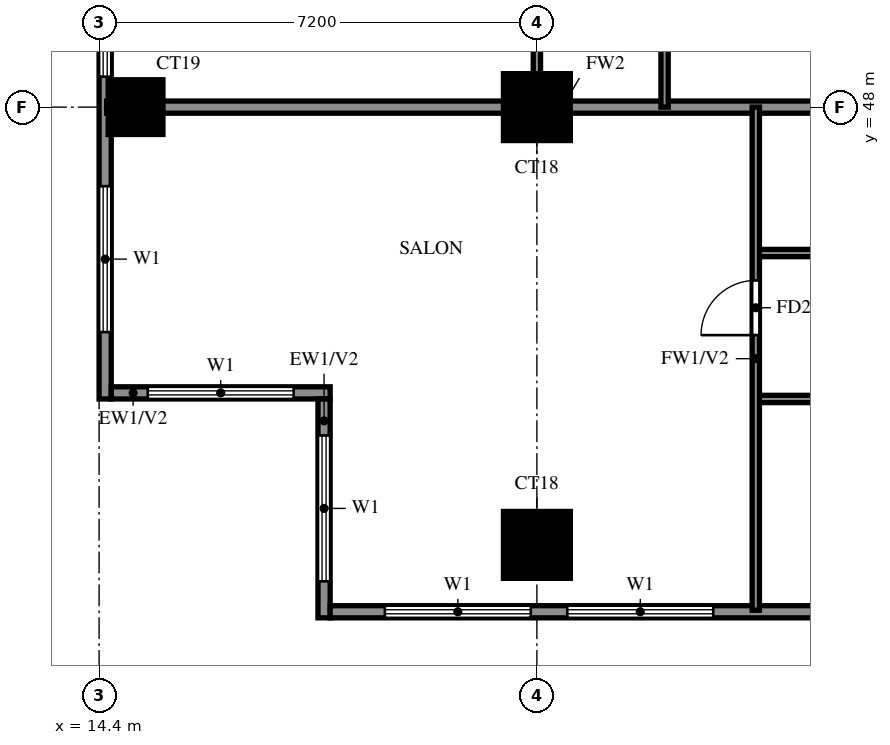
"""IFC4 building model, lengths in metres.
Left out: names, types, materials, properties, quantities, classifications, styles, units other than length and angle.
Written with IfcOpenShell. Run it as: python <this file> out.ifc"""

import sys

from ifc_helpers import new_model, si_unit, direction, frame, frame_2d, origin, origin_2d, place, context, subcontext, project, spatial, rectangle, extrude, source, transform, mapped, element, fill, save


model = new_model("IFC4")
c1 = context("Model", 3, precision=1e-05, world=origin(), true_north=direction((0.0, 1.0)))
c2 = subcontext(c1, "Body", "Model", "MODEL_VIEW")
j1 = project(units=[si_unit("LENGTHUNIT", "METRE"), si_unit("PLANEANGLEUNIT", "RADIAN")], contexts=[c1])
p1 = place(None, origin())
s1 = spatial("IfcSite", under=j1, at=p1, CompositionType="ELEMENT")
p2 = place(p1, origin())
s2 = spatial("IfcBuilding", under=s1, at=p2, CompositionType="ELEMENT")
p3 = place(p2, frame((0.0, 0.0, 127.0)))
s3 = spatial("IfcBuildingStorey", under=s2, at=p3, CompositionType="ELEMENT", Elevation=127.0)
m1 = source(origin(), c2, "Body", "SweptSolid", [
    extrude(rectangle(XDim=1.1, YDim=1.1, at=origin_2d()), origin(), (0.0, 0.0, 1.0), 3.2),
])
p4 = place(p3, frame((21.6, 40.8, 0.0), z_axis=(0.0, 0.0, 1.0), x_axis=(1.0, 0.0, 0.0)))
e1 = element("IfcColumn", 1, at=p4, inside=s3, PredefinedType="COLUMN", context=c2, shape_type="MappedRepresentation", body=[
    mapped(m1, transform((0.0, 0.0, 0.0))),
])
m2 = source(origin(), c2, "Body", "SweptSolid", [
    extrude(rectangle(XDim=0.9, YDim=0.9, at=origin_2d()), origin(), (0.0, 0.0, 1.0), 3.2),
])
p5 = place(p3, frame((15.0, 48.0, 0.0), z_axis=(0.0, 0.0, 1.0), x_axis=(1.0, 0.0, 0.0)))
e2 = element("IfcColumn", 2, at=p5, inside=s3, PredefinedType="COLUMN", context=c2, shape_type="MappedRepresentation", body=[
    mapped(m2, transform((0.0, 0.0, 0.0))),
])
p6 = place(p3, frame((21.6, 48.0, 0.0), z_axis=(0.0, 0.0, 1.0), x_axis=(1.0, 0.0, 0.0)))
e3 = element("IfcColumn", 3, at=p6, inside=s3, PredefinedType="COLUMN", context=c2, shape_type="MappedRepresentation", body=[
    mapped(m1, transform((0.0, 0.0, 0.0))),
])
p7 = place(p3, frame((14.5, 76.6, 0.0), z_axis=(0.0, 0.0, 1.0), x_axis=(0.0, -1.0, 0.0)))
e4 = element("IfcWall", 4, at=p7, inside=s3, PredefinedType="SOLIDWALL", context=c2, shape_type="SweptSolid", body=[
    extrude(rectangle(XDim=33.4, YDim=0.2, at=frame_2d((16.7, 0.0))), origin(), (0.0, 0.0, 1.0), 3.2),
])
p8 = place(p7, frame((7.9, 0.0, 0.0)))
e5 = element("IfcOpeningElement", 5, at=p8, cuts=e4, PredefinedType="OPENING", context=c2, shape_type="SweptSolid", body=[
    extrude(rectangle(XDim=1.8, YDim=2.4, at=frame_2d((0.9, 1.2))), frame((0.0, 0.11, 0.0), z_axis=(0.0, -1.0, 0.0), x_axis=(1.0, 0.0, 0.0)), (0.0, 0.0, 1.0), 0.22),
])
p9 = place(p7, frame((22.3, 0.0, 0.0)))
e6 = element("IfcOpeningElement", 6, at=p9, cuts=e4, PredefinedType="OPENING", context=c2, shape_type="SweptSolid", body=[
    extrude(rectangle(XDim=1.8, YDim=2.4, at=frame_2d((0.9, 1.2))), frame((0.0, 0.11, 0.0), z_axis=(0.0, -1.0, 0.0), x_axis=(1.0, 0.0, 0.0)), (0.0, 0.0, 1.0), 0.22),
])
p10 = place(p7, frame((29.9, 0.0, 0.6)))
e7 = element("IfcOpeningElement", 7, at=p10, cuts=e4, PredefinedType="OPENING", context=c2, shape_type="SweptSolid", body=[
    extrude(rectangle(XDim=2.4, YDim=2.4, at=frame_2d((1.2, 1.2))), frame((0.0, 0.11, 0.0), z_axis=(0.0, -1.0, 0.0), x_axis=(1.0, 0.0, 0.0)), (0.0, 0.0, 1.0), 0.22),
])
p11 = place(p7, frame((24.55, 0.0, 0.6)))
e8 = element("IfcOpeningElement", 8, at=p11, cuts=e4, PredefinedType="OPENING", context=c2, shape_type="SweptSolid", body=[
    extrude(rectangle(XDim=0.9, YDim=2.4, at=frame_2d((0.45, 1.2))), frame((0.0, 0.11, 0.0), z_axis=(0.0, -1.0, 0.0), x_axis=(1.0, 0.0, 0.0)), (0.0, 0.0, 1.0), 0.22),
])
p12 = place(p7, frame((26.3, 0.0, 0.6)))
e9 = element("IfcOpeningElement", 9, at=p12, cuts=e4, PredefinedType="OPENING", context=c2, shape_type="SweptSolid", body=[
    extrude(rectangle(XDim=1.8, YDim=2.4, at=frame_2d((0.9, 1.2))), frame((0.0, 0.11, 0.0), z_axis=(0.0, -1.0, 0.0), x_axis=(1.0, 0.0, 0.0)), (0.0, 0.0, 1.0), 0.22),
])
p13 = place(p7, frame((17.95, 0.0, 0.6)))
e10 = element("IfcOpeningElement", 10, at=p13, cuts=e4, PredefinedType="OPENING", context=c2, shape_type="SweptSolid", body=[
    extrude(rectangle(XDim=0.9, YDim=2.4, at=frame_2d((0.45, 1.2))), frame((0.0, 0.11, 0.0), z_axis=(0.0, -1.0, 0.0), x_axis=(1.0, 0.0, 0.0)), (0.0, 0.0, 1.0), 0.22),
])
p14 = place(p7, frame((19.85, 0.0, 0.6)))
e11 = element("IfcOpeningElement", 11, at=p14, cuts=e4, PredefinedType="OPENING", context=c2, shape_type="SweptSolid", body=[
    extrude(rectangle(XDim=0.9, YDim=2.4, at=frame_2d((0.45, 1.2))), frame((0.0, 0.11, 0.0), z_axis=(0.0, -1.0, 0.0), x_axis=(1.0, 0.0, 0.0)), (0.0, 0.0, 1.0), 0.22),
])
p15 = place(p7, frame((15.3, 0.0, 0.6)))
e12 = element("IfcOpeningElement", 12, at=p15, cuts=e4, PredefinedType="OPENING", context=c2, shape_type="SweptSolid", body=[
    extrude(rectangle(XDim=1.8, YDim=2.4, at=frame_2d((0.9, 1.2))), frame((0.0, 0.11, 0.0), z_axis=(0.0, -1.0, 0.0), x_axis=(1.0, 0.0, 0.0)), (0.0, 0.0, 1.0), 0.22),
])
p16 = place(p7, frame((12.35, 0.0, 1.5)))
e13 = element("IfcOpeningElement", 13, at=p16, cuts=e4, PredefinedType="OPENING", context=c2, shape_type="SweptSolid", body=[
    extrude(rectangle(XDim=0.9, YDim=0.9, at=frame_2d((0.45, 0.45))), frame((0.0, 0.11, 0.0), z_axis=(0.0, -1.0, 0.0), x_axis=(1.0, 0.0, 0.0)), (0.0, 0.0, 1.0), 0.22),
])
p17 = place(p7, frame((3.55, 0.0, 0.6)))
e14 = element("IfcOpeningElement", 14, at=p17, cuts=e4, PredefinedType="OPENING", context=c2, shape_type="SweptSolid", body=[
    extrude(rectangle(XDim=0.9, YDim=2.4, at=frame_2d((0.45, 1.2))), frame((0.0, 0.11, 0.0), z_axis=(0.0, -1.0, 0.0), x_axis=(1.0, 0.0, 0.0)), (0.0, 0.0, 1.0), 0.22),
])
p18 = place(p7, frame((5.3, 0.0, 0.6)))
e15 = element("IfcOpeningElement", 15, at=p18, cuts=e4, PredefinedType="OPENING", context=c2, shape_type="SweptSolid", body=[
    extrude(rectangle(XDim=1.2, YDim=2.4, at=frame_2d((0.6, 1.2))), frame((0.0, 0.11, 0.0), z_axis=(0.0, -1.0, 0.0), x_axis=(1.0, 0.0, 0.0)), (0.0, 0.0, 1.0), 0.22),
])
p19 = place(p7, frame((0.6, 0.0, 0.6)))
e16 = element("IfcOpeningElement", 16, at=p19, cuts=e4, PredefinedType="OPENING", context=c2, shape_type="SweptSolid", body=[
    extrude(rectangle(XDim=2.4, YDim=2.4, at=frame_2d((1.2, 1.2))), frame((0.0, 0.11, 0.0), z_axis=(0.0, -1.0, 0.0), x_axis=(1.0, 0.0, 0.0)), (0.0, 0.0, 1.0), 0.22),
])
p20 = place(p3, frame((14.6, 43.3, 0.0), z_axis=(0.0, 0.0, 1.0), x_axis=(1.0, 0.0, 0.0)))
e17 = element("IfcWall", 17, at=p20, inside=s3, PredefinedType="SOLIDWALL", context=c2, shape_type="SweptSolid", body=[
    extrude(rectangle(XDim=3.6, YDim=0.2, at=frame_2d((1.8, 0.0))), origin(), (0.0, 0.0, 1.0), 3.2),
])
p21 = place(p20, frame((0.6, 0.0, 0.6)))
e18 = element("IfcOpeningElement", 18, at=p21, cuts=e17, PredefinedType="OPENING", context=c2, shape_type="SweptSolid", body=[
    extrude(rectangle(XDim=2.4, YDim=2.4, at=frame_2d((1.2, 1.2))), frame((0.0, 0.11, 0.0), z_axis=(0.0, -1.0, 0.0), x_axis=(1.0, 0.0, 0.0)), (0.0, 0.0, 1.0), 0.22),
])
p22 = place(p3, frame((18.1, 43.2, 0.0), z_axis=(0.0, 0.0, 1.0), x_axis=(0.0, -1.0, 0.0)))
e19 = element("IfcWall", 19, at=p22, inside=s3, PredefinedType="SOLIDWALL", context=c2, shape_type="SweptSolid", body=[
    extrude(rectangle(XDim=3.6, YDim=0.2, at=frame_2d((1.8, 0.0))), origin(), (0.0, 0.0, 1.0), 3.2),
])
p23 = place(p22, frame((0.6, 0.0, 0.6)))
e20 = element("IfcOpeningElement", 20, at=p23, cuts=e19, PredefinedType="OPENING", context=c2, shape_type="SweptSolid", body=[
    extrude(rectangle(XDim=2.4, YDim=2.4, at=frame_2d((1.2, 1.2))), frame((0.0, 0.11, 0.0), z_axis=(0.0, -1.0, 0.0), x_axis=(1.0, 0.0, 0.0)), (0.0, 0.0, 1.0), 0.22),
])
p24 = place(p3, frame((18.2, 39.7, 0.0), z_axis=(0.0, 0.0, 1.0), x_axis=(1.0, 0.0, 0.0)))
e21 = element("IfcWall", 21, at=p24, inside=s3, PredefinedType="SOLIDWALL", context=c2, shape_type="SweptSolid", body=[
    extrude(rectangle(XDim=23.8, YDim=0.2, at=frame_2d((11.9, 0.0))), origin(), (0.0, 0.0, 1.0), 3.2),
])
p25 = place(p24, frame((13.3, 0.0, 0.0)))
e22 = element("IfcOpeningElement", 22, at=p25, cuts=e21, PredefinedType="OPENING", context=c2, shape_type="SweptSolid", body=[
    extrude(rectangle(XDim=1.8, YDim=2.4, at=frame_2d((0.9, 1.2))), frame((0.0, 0.11, 0.0), z_axis=(0.0, -1.0, 0.0), x_axis=(1.0, 0.0, 0.0)), (0.0, 0.0, 1.0), 0.22),
])
p26 = place(p24, frame((0.9, 0.0, 0.6)))
e23 = element("IfcOpeningElement", 23, at=p26, cuts=e21, PredefinedType="OPENING", context=c2, shape_type="SweptSolid", body=[
    extrude(rectangle(XDim=2.4, YDim=2.4, at=frame_2d((1.2, 1.2))), frame((0.0, 0.11, 0.0), z_axis=(0.0, -1.0, 0.0), x_axis=(1.0, 0.0, 0.0)), (0.0, 0.0, 1.0), 0.22),
])
p27 = place(p24, frame((3.9, 0.0, 0.6)))
e24 = element("IfcOpeningElement", 24, at=p27, cuts=e21, PredefinedType="OPENING", context=c2, shape_type="SweptSolid", body=[
    extrude(rectangle(XDim=2.4, YDim=2.4, at=frame_2d((1.2, 1.2))), frame((0.0, 0.11, 0.0), z_axis=(0.0, -1.0, 0.0), x_axis=(1.0, 0.0, 0.0)), (0.0, 0.0, 1.0), 0.22),
])
p28 = place(p24, frame((11.5, 0.0, 0.6)))
e25 = element("IfcOpeningElement", 25, at=p28, cuts=e21, PredefinedType="OPENING", context=c2, shape_type="SweptSolid", body=[
    extrude(rectangle(XDim=1.2, YDim=2.4, at=frame_2d((0.6, 1.2))), frame((0.0, 0.11, 0.0), z_axis=(0.0, -1.0, 0.0), x_axis=(1.0, 0.0, 0.0)), (0.0, 0.0, 1.0), 0.22),
])
p29 = place(p24, frame((8.35, 0.0, 1.5)))
e26 = element("IfcOpeningElement", 26, at=p29, cuts=e21, PredefinedType="OPENING", context=c2, shape_type="SweptSolid", body=[
    extrude(rectangle(XDim=0.9, YDim=0.9, at=frame_2d((0.45, 0.45))), frame((0.0, 0.11, 0.0), z_axis=(0.0, -1.0, 0.0), x_axis=(1.0, 0.0, 0.0)), (0.0, 0.0, 1.0), 0.22),
])
p30 = place(p3, frame((14.525, 48.0, 0.0), z_axis=(0.0, 0.0, 1.0), x_axis=(1.0, 0.0, 0.0)))
e27 = element("IfcWall", 27, at=p30, inside=s3, PredefinedType="SOLIDWALL", context=c2, shape_type="SweptSolid", body=[
    extrude(rectangle(XDim=14.275, YDim=0.2, at=frame_2d((7.138, 0.0))), origin(), (0.0, 0.0, 1.0), 3.2),
])
p31 = place(p3, frame((25.2, 43.2, 0.0), z_axis=(0.0, 0.0, 1.0), x_axis=(1.0, 0.0, 0.0)))
e28 = element("IfcWall", 28, at=p31, inside=s3, PredefinedType="PARTITIONING", context=c2, shape_type="SweptSolid", body=[
    extrude(rectangle(XDim=3.6, YDim=0.12, at=frame_2d((1.8, 0.0))), origin(), (0.0, 0.0, 1.0), 3.2),
])
p32 = place(p3, frame((25.2, 45.6, 0.0), z_axis=(0.0, 0.0, 1.0), x_axis=(1.0, 0.0, 0.0)))
e29 = element("IfcWall", 29, at=p32, inside=s3, PredefinedType="PARTITIONING", context=c2, shape_type="SweptSolid", body=[
    extrude(rectangle(XDim=6.0, YDim=0.12, at=frame_2d((3.0, 0.0))), origin(), (0.0, 0.0, 1.0), 3.2),
])
p33 = place(p32, frame((2.55, 0.0, 0.0)))
e30 = element("IfcOpeningElement", 30, at=p33, cuts=e29, PredefinedType="OPENING", context=c2, shape_type="SweptSolid", body=[
    extrude(rectangle(XDim=0.9, YDim=2.1, at=frame_2d((0.45, 1.05))), frame((0.0, 0.07, 0.0), z_axis=(0.0, -1.0, 0.0), x_axis=(1.0, 0.0, 0.0)), (0.0, 0.0, 1.0), 0.14),
])
p34 = place(p3, frame((21.6, 48.0, 0.0), z_axis=(0.0, 0.0, 1.0), x_axis=(0.0, 1.0, 0.0)))
e31 = element("IfcWall", 31, at=p34, inside=s3, PredefinedType="PARTITIONING", context=c2, shape_type="SweptSolid", body=[
    extrude(rectangle(XDim=14.4, YDim=0.12, at=frame_2d((7.2, 0.0))), origin(), (0.0, 0.0, 1.0), 3.2),
])
p35 = place(p34, frame((2.85, 0.0, 0.0)))
e32 = element("IfcOpeningElement", 32, at=p35, cuts=e31, PredefinedType="OPENING", context=c2, shape_type="SweptSolid", body=[
    extrude(rectangle(XDim=1.5, YDim=2.1, at=frame_2d((0.75, 1.05))), frame((0.0, 0.07, 0.0), z_axis=(0.0, -1.0, 0.0), x_axis=(1.0, 0.0, 0.0)), (0.0, 0.0, 1.0), 0.14),
])
p36 = place(p34, frame((8.55, 0.0, 0.0)))
e33 = element("IfcOpeningElement", 33, at=p36, cuts=e31, PredefinedType="OPENING", context=c2, shape_type="SweptSolid", body=[
    extrude(rectangle(XDim=0.9, YDim=2.1, at=frame_2d((0.45, 1.05))), frame((0.0, 0.07, 0.0), z_axis=(0.0, -1.0, 0.0), x_axis=(1.0, 0.0, 0.0)), (0.0, 0.0, 1.0), 0.14),
])
p37 = place(p34, frame((12.15, 0.0, 0.0)))
e34 = element("IfcOpeningElement", 34, at=p37, cuts=e31, PredefinedType="OPENING", context=c2, shape_type="SweptSolid", body=[
    extrude(rectangle(XDim=0.9, YDim=2.1, at=frame_2d((0.45, 1.05))), frame((0.0, 0.07, 0.0), z_axis=(0.0, -1.0, 0.0), x_axis=(1.0, 0.0, 0.0)), (0.0, 0.0, 1.0), 0.14),
])
p38 = place(p3, frame((23.7, 48.0, 0.0), z_axis=(0.0, 0.0, 1.0), x_axis=(0.0, 1.0, 0.0)))
e35 = element("IfcWall", 35, at=p38, inside=s3, PredefinedType="PARTITIONING", context=c2, shape_type="SweptSolid", body=[
    extrude(rectangle(XDim=2.4, YDim=0.12, at=frame_2d((1.2, 0.0))), origin(), (0.0, 0.0, 1.0), 3.2),
])
p39 = place(p3, frame((25.2, 39.725, 0.0), z_axis=(0.0, 0.0, 1.0), x_axis=(0.0, 1.0, 0.0)))
e36 = element("IfcWall", 36, at=p39, inside=s3, PredefinedType="PARTITIONING", context=c2, shape_type="SweptSolid", body=[
    extrude(rectangle(XDim=8.275, YDim=0.12, at=frame_2d((4.137, 0.0))), origin(), (0.0, 0.0, 1.0), 3.2),
])
p40 = place(p39, frame((4.525, 0.0, 0.0)))
e37 = element("IfcOpeningElement", 37, at=p40, cuts=e36, PredefinedType="OPENING", context=c2, shape_type="SweptSolid", body=[
    extrude(rectangle(XDim=0.9, YDim=2.1, at=frame_2d((0.45, 1.05))), frame((0.0, 0.07, 0.0), z_axis=(0.0, -1.0, 0.0), x_axis=(1.0, 0.0, 0.0)), (0.0, 0.0, 1.0), 0.14),
])
p41 = place(p10, origin())
e38 = element("IfcWindow", 38, at=p41, inside=s3, PartitioningType="DOUBLE_PANEL_VERTICAL", PredefinedType="WINDOW", context=c2, shape_type="SweptSolid", body=[
    extrude(rectangle(XDim=2.4, YDim=2.4, at=frame_2d((1.2, 1.2))), frame((0.0, 0.03, 0.0), z_axis=(0.0, -1.0, 0.0), x_axis=(1.0, 0.0, 0.0)), (0.0, 0.0, 1.0), 0.06),
])
fill(e7, e38)
p42 = place(p12, origin())
e39 = element("IfcWindow", 39, at=p42, inside=s3, PartitioningType="DOUBLE_PANEL_VERTICAL", PredefinedType="WINDOW", context=c2, shape_type="SweptSolid", body=[
    extrude(rectangle(XDim=1.8, YDim=2.4, at=frame_2d((0.9, 1.2))), frame((0.0, 0.03, 0.0), z_axis=(0.0, -1.0, 0.0), x_axis=(1.0, 0.0, 0.0)), (0.0, 0.0, 1.0), 0.06),
])
fill(e9, e39)
p43 = place(p21, origin())
e40 = element("IfcWindow", 40, at=p43, inside=s3, PartitioningType="DOUBLE_PANEL_VERTICAL", PredefinedType="WINDOW", context=c2, shape_type="SweptSolid", body=[
    extrude(rectangle(XDim=2.4, YDim=2.4, at=frame_2d((1.2, 1.2))), frame((0.0, 0.03, 0.0), z_axis=(0.0, -1.0, 0.0), x_axis=(1.0, 0.0, 0.0)), (0.0, 0.0, 1.0), 0.06),
])
fill(e18, e40)
p44 = place(p23, origin())
e41 = element("IfcWindow", 41, at=p44, inside=s3, PartitioningType="DOUBLE_PANEL_VERTICAL", PredefinedType="WINDOW", context=c2, shape_type="SweptSolid", body=[
    extrude(rectangle(XDim=2.4, YDim=2.4, at=frame_2d((1.2, 1.2))), frame((0.0, 0.03, 0.0), z_axis=(0.0, -1.0, 0.0), x_axis=(1.0, 0.0, 0.0)), (0.0, 0.0, 1.0), 0.06),
])
fill(e20, e41)
p45 = place(p26, origin())
e42 = element("IfcWindow", 42, at=p45, inside=s3, PartitioningType="DOUBLE_PANEL_VERTICAL", PredefinedType="WINDOW", context=c2, shape_type="SweptSolid", body=[
    extrude(rectangle(XDim=2.4, YDim=2.4, at=frame_2d((1.2, 1.2))), frame((0.0, 0.03, 0.0), z_axis=(0.0, -1.0, 0.0), x_axis=(1.0, 0.0, 0.0)), (0.0, 0.0, 1.0), 0.06),
])
fill(e23, e42)
p46 = place(p27, origin())
e43 = element("IfcWindow", 43, at=p46, inside=s3, PartitioningType="DOUBLE_PANEL_VERTICAL", PredefinedType="WINDOW", context=c2, shape_type="SweptSolid", body=[
    extrude(rectangle(XDim=2.4, YDim=2.4, at=frame_2d((1.2, 1.2))), frame((0.0, 0.03, 0.0), z_axis=(0.0, -1.0, 0.0), x_axis=(1.0, 0.0, 0.0)), (0.0, 0.0, 1.0), 0.06),
])
fill(e24, e43)
p47 = place(p40, origin())
e44 = element("IfcDoor", 44, at=p47, inside=s3, OperationType="SINGLE_SWING_LEFT", PredefinedType="DOOR", context=c2, shape_type="SweptSolid", body=[
    extrude(rectangle(XDim=0.9, YDim=2.1, at=frame_2d((0.45, 1.05))), frame((0.0, 0.025, 0.0), z_axis=(0.0, -1.0, 0.0), x_axis=(1.0, 0.0, 0.0)), (0.0, 0.0, 1.0), 0.05),
])
fill(e37, e44)
save(model, sys.argv[1])
